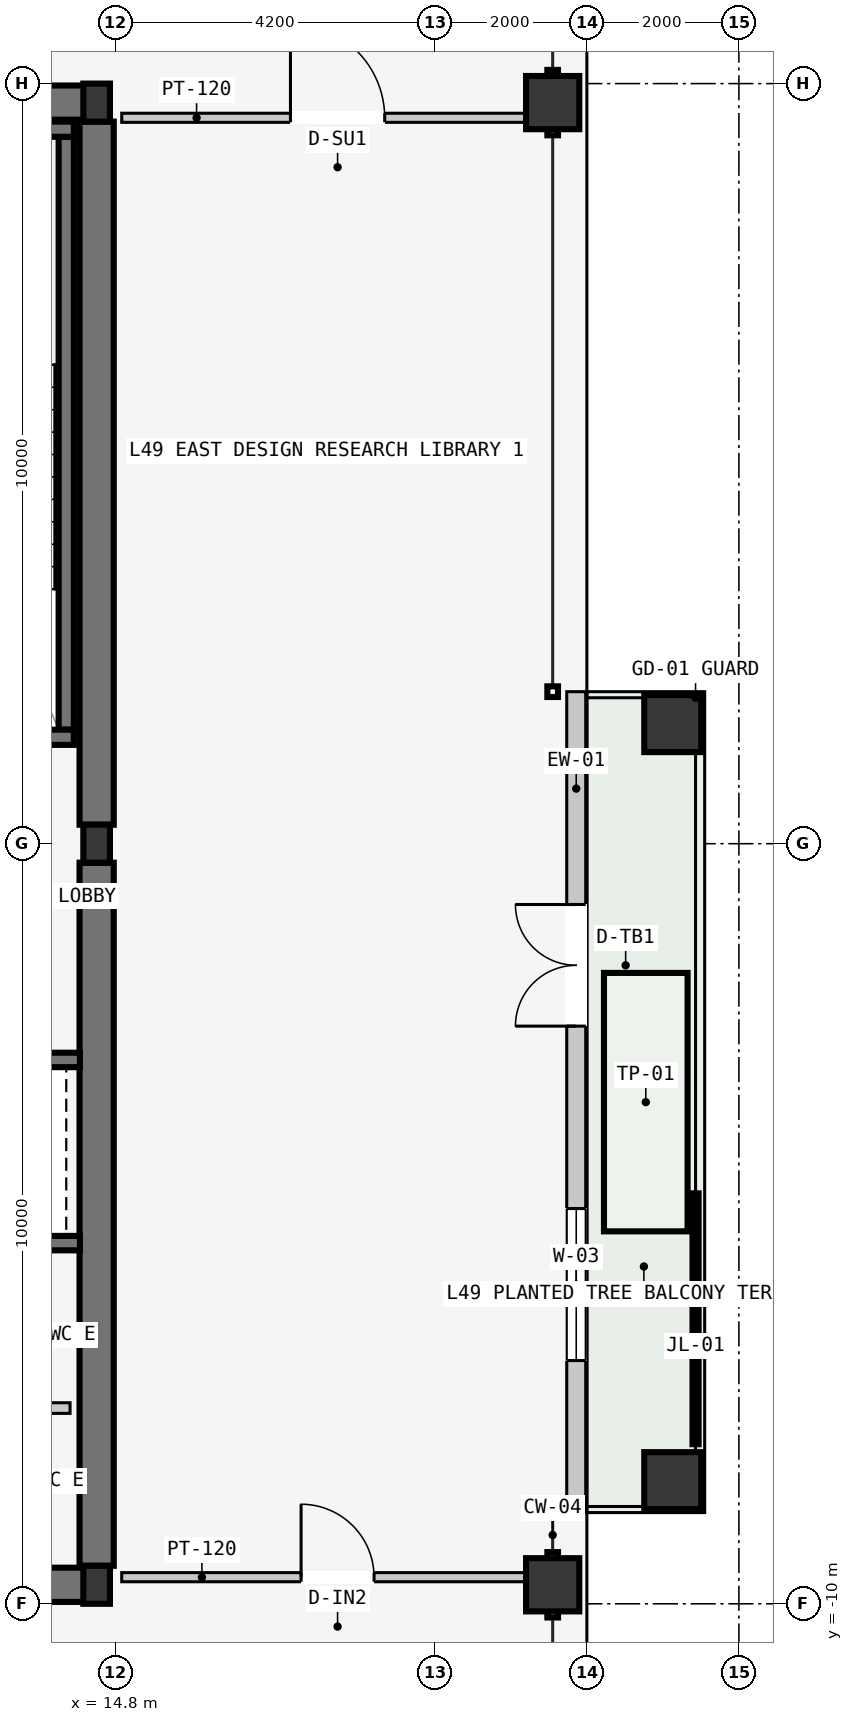
"""IFC4 building model, lengths in metres.
Left out: names, types, materials, properties, quantities, classifications, styles, units other than length and angle.
Written with IfcOpenShell. Run it as: python <this file> out.ifc"""

import sys

from ifc_helpers import new_model, si_unit, direction, frame, frame_2d, origin, origin_2d, place, context, subcontext, project, spatial, rectangle, hollow_rectangle, i_section, extrude, element, fill, save


model = new_model("IFC4")
c1 = context("Model", 3, precision=1e-05, world=origin(), true_north=direction((0.0, 1.0)))
c2 = subcontext(c1, "Body", "Model", "MODEL_VIEW")
j1 = project(units=[si_unit("LENGTHUNIT", "METRE"), si_unit("PLANEANGLEUNIT", "RADIAN")], contexts=[c1])
p1 = place(None, origin())
s1 = spatial("IfcSite", under=j1, at=p1, CompositionType="ELEMENT")
p2 = place(p1, origin())
s2 = spatial("IfcBuilding", under=s1, at=p2, CompositionType="ELEMENT")
p3 = place(p2, frame((0.0, 0.0, 187.5)))
s3 = spatial("IfcBuildingStorey", under=s2, at=p3, CompositionType="ELEMENT", Elevation=187.5)
for number, where, z_axis, x_axis in (
    (1, (8.07, -9.75, -0.2), (0.0, 0.0, 1.0), (1.0, 0.0, 0.0)),
    (2, (8.07, 9.75, -0.2), (0.0, 0.0, 1.0), (1.0, 0.0, 0.0)),
):
    element("IfcWall", number, at=place(p3, frame(where, z_axis=z_axis, x_axis=x_axis)), inside=s3, PredefinedType="SHEAR", context=c2, shape_type="SweptSolid", body=[
        extrude(rectangle(XDim=6.46, YDim=0.45, at=frame_2d((3.23, 0.0))), origin(), (0.0, 0.0, 1.0), 3.6),
    ])
for number, where, z_axis, x_axis in (
    (3, (14.55, -9.5, -0.2), (0.0, 0.0, 1.0), (0.0, 1.0, 0.0)),
    (4, (14.55, 0.25, -0.2), (0.0, 0.0, 1.0), (0.0, 1.0, 0.0)),
):
    element("IfcWall", number, at=place(p3, frame(where, z_axis=z_axis, x_axis=x_axis)), inside=s3, PredefinedType="SHEAR", context=c2, shape_type="SweptSolid", body=[
        extrude(rectangle(XDim=9.25, YDim=0.45, at=frame_2d((4.625, 0.0))), origin(), (0.0, 0.0, 1.0), 3.6),
    ])
p4 = place(p3, frame((14.15, 1.5, -0.2), z_axis=(0.0, 0.0, 1.0), x_axis=(0.0, 1.0, 0.0)))
e5 = element("IfcWall", 5, at=p4, inside=s3, PredefinedType="SOLIDWALL", context=c2, shape_type="SweptSolid", body=[
    extrude(rectangle(XDim=7.8, YDim=0.2, at=frame_2d((3.9, 0.0))), origin(), (0.0, 0.0, 1.0), 3.6),
])
p5 = place(p3, frame((10.53, 1.4, -0.2), z_axis=(0.0, 0.0, 1.0), x_axis=(1.0, 0.0, 0.0)))
e6 = element("IfcWall", 6, at=p5, inside=s3, PredefinedType="SOLIDWALL", context=c2, shape_type="SweptSolid", body=[
    extrude(rectangle(XDim=3.72, YDim=0.2, at=frame_2d((1.86, 0.0))), origin(), (0.0, 0.0, 1.0), 3.6),
])
p6 = place(p5, frame((1.5, 0.0, 0.2)))
e7 = element("IfcOpeningElement", 7, at=p6, cuts=e6, PredefinedType="OPENING", context=c2, shape_type="SweptSolid", body=[
    extrude(rectangle(XDim=1.12, YDim=2.18, at=frame_2d((0.56, 1.09))), frame((0.0, 0.11, 0.0), z_axis=(0.0, -1.0, 0.0), x_axis=(1.0, 0.0, 0.0)), (0.0, 0.0, 1.0), 0.22),
])
p7 = place(p3, frame((10.53, 9.4, -0.2), z_axis=(0.0, 0.0, 1.0), x_axis=(1.0, 0.0, 0.0)))
e8 = element("IfcWall", 8, at=p7, inside=s3, PredefinedType="SOLIDWALL", context=c2, shape_type="SweptSolid", body=[
    extrude(rectangle(XDim=3.72, YDim=0.2, at=frame_2d((1.86, 0.0))), origin(), (0.0, 0.0, 1.0), 3.6),
])
for number, where, z_axis, x_axis in (
    (9, (14.55, -9.75, 0.0), (0.0, 0.0, 1.0), (1.0, 0.0, 0.0)),
    (10, (14.55, 0.0, 0.0), (0.0, 0.0, 1.0), (1.0, 0.0, 0.0)),
    (11, (14.55, 9.75, 0.0), (0.0, 0.0, 1.0), (1.0, 0.0, 0.0)),
):
    element("IfcColumn", number, at=place(p3, frame(where, z_axis=z_axis, x_axis=x_axis)), inside=s3, PredefinedType="COLUMN", context=c2, shape_type="SweptSolid", body=[
        extrude(i_section(OverallWidth=0.35, OverallDepth=0.5, WebThickness=0.02, FlangeThickness=0.032, at=origin_2d()), origin(), (0.0, 0.0, 1.0), 3.6),
    ])
for number, where, z_axis, x_axis in (
    (12, (20.55, -9.75, 0.0), (0.0, 0.0, 1.0), (0.0, 1.0, 0.0)),
    (13, (20.55, 9.75, 0.0), (0.0, 0.0, 1.0), (0.0, 1.0, 0.0)),
):
    element("IfcColumn", number, at=place(p3, frame(where, z_axis=z_axis, x_axis=x_axis)), inside=s3, PredefinedType="COLUMN", context=c2, shape_type="SweptSolid", body=[
        extrude(hollow_rectangle(XDim=0.7, YDim=0.7, WallThickness=0.03, at=origin_2d()), origin(), (0.0, 0.0, 1.0), 3.6),
    ])
for number, where, z_axis, x_axis in (
    (14, (22.13, -8.38, 0.0), (0.0, 0.0, 1.0), (0.0, 1.0, 0.0)),
    (15, (22.13, 1.58, 0.0), (0.0, 0.0, 1.0), (0.0, 1.0, 0.0)),
):
    element("IfcColumn", number, at=place(p3, frame(where, z_axis=z_axis, x_axis=x_axis)), inside=s3, PredefinedType="COLUMN", context=c2, shape_type="SweptSolid", body=[
        extrude(hollow_rectangle(XDim=0.75, YDim=0.75, WallThickness=0.032, at=origin_2d()), origin(), (0.0, 0.0, 1.0), 3.6),
    ])
p8 = place(p3, frame((20.86, -8.8, 0.0), z_axis=(0.0, 0.0, 1.0), x_axis=(0.0, 1.0, 0.0)))
e16 = element("IfcWall", 16, at=p8, inside=s3, PredefinedType="STANDARD", context=c2, shape_type="SweptSolid", body=[
    extrude(rectangle(XDim=10.8, YDim=0.25, at=frame_2d((5.4, 0.0))), origin(), (0.0, 0.0, 1.0), 3.4),
])
p9 = place(p8, frame((6.4, 0.0, 0.0)))
e17 = element("IfcOpeningElement", 17, at=p9, cuts=e16, PredefinedType="OPENING", context=c2, shape_type="SweptSolid", body=[
    extrude(rectangle(XDim=1.6, YDim=2.2, at=frame_2d((0.8, 1.1))), frame((0.0, 0.135, 0.0), z_axis=(0.0, -1.0, 0.0), x_axis=(1.0, 0.0, 0.0)), (0.0, 0.0, 1.0), 0.27),
])
p10 = place(p8, frame((2.0, 0.0, 0.85)))
e18 = element("IfcOpeningElement", 18, at=p10, cuts=e16, PredefinedType="OPENING", context=c2, shape_type="SweptSolid", body=[
    extrude(rectangle(XDim=2.0, YDim=2.1, at=frame_2d((1.0, 1.05))), frame((0.0, 0.135, 0.0), z_axis=(0.0, -1.0, 0.0), x_axis=(1.0, 0.0, 0.0)), (0.0, 0.0, 1.0), 0.27),
])
p11 = place(p3, frame((11.65, -2.845, -0.2), z_axis=(0.0, 0.0, 1.0), x_axis=(1.0, 0.0, 0.0)))
e19 = element("IfcWall", 19, at=p11, inside=s3, PredefinedType="SOLIDWALL", context=c2, shape_type="SweptSolid", body=[
    extrude(rectangle(XDim=2.68, YDim=0.19, at=frame_2d((1.34, 0.0))), origin(), (0.0, 0.0, 1.0), 3.6),
])
p12 = place(p11, frame((0.65, 0.0, 0.2)))
e20 = element("IfcOpeningElement", 20, at=p12, cuts=e19, PredefinedType="OPENING", context=c2, shape_type="SweptSolid", body=[
    extrude(rectangle(XDim=1.2, YDim=2.2, at=frame_2d((0.6, 1.1))), frame((0.0, 0.105, 0.0), z_axis=(0.0, -1.0, 0.0), x_axis=(1.0, 0.0, 0.0)), (0.0, 0.0, 1.0), 0.21),
])
p13 = place(p3, frame((11.65, -5.255, -0.2), z_axis=(0.0, 0.0, 1.0), x_axis=(1.0, 0.0, 0.0)))
e21 = element("IfcWall", 21, at=p13, inside=s3, PredefinedType="SOLIDWALL", context=c2, shape_type="SweptSolid", body=[
    extrude(rectangle(XDim=2.68, YDim=0.19, at=frame_2d((1.34, 0.0))), origin(), (0.0, 0.0, 1.0), 3.6),
])
p14 = place(p3, frame((11.7, -7.425, 0.0), z_axis=(0.0, 0.0, 1.0), x_axis=(1.0, 0.0, 0.0)))
e22 = element("IfcWall", 22, at=p14, inside=s3, PredefinedType="PARTITIONING", context=c2, shape_type="SweptSolid", body=[
    extrude(rectangle(XDim=2.5, YDim=0.14, at=frame_2d((1.25, 0.0))), origin(), (0.0, 0.0, 1.0), 3.4),
])
p15 = place(p3, frame((14.88, 9.55, 0.0), z_axis=(0.0, 0.0, 1.0), x_axis=(1.0, 0.0, 0.0)))
e23 = element("IfcWall", 23, at=p15, inside=s3, PredefinedType="PARTITIONING", context=c2, shape_type="SweptSolid", body=[
    extrude(rectangle(XDim=5.68, YDim=0.12, at=frame_2d((2.84, 0.0))), origin(), (0.0, 0.0, 1.0), 3.4),
])
p16 = place(p15, frame((2.22, 0.0, 0.0)))
e24 = element("IfcOpeningElement", 24, at=p16, cuts=e23, PredefinedType="OPENING", context=c2, shape_type="SweptSolid", body=[
    extrude(rectangle(XDim=1.24, YDim=2.24, at=frame_2d((0.62, 1.12))), frame((0.0, 0.07, 0.0), z_axis=(0.0, -1.0, 0.0), x_axis=(1.0, 0.0, 0.0)), (0.0, 0.0, 1.0), 0.14),
])
p17 = place(p3, frame((14.88, -9.65, 0.0), z_axis=(0.0, 0.0, 1.0), x_axis=(1.0, 0.0, 0.0)))
e25 = element("IfcWall", 25, at=p17, inside=s3, PredefinedType="PARTITIONING", context=c2, shape_type="SweptSolid", body=[
    extrude(rectangle(XDim=5.68, YDim=0.12, at=frame_2d((2.84, 0.0))), origin(), (0.0, 0.0, 1.0), 2.75),
])
p18 = place(p17, frame((2.36, 0.0, 0.0)))
e26 = element("IfcOpeningElement", 26, at=p18, cuts=e25, PredefinedType="OPENING", context=c2, shape_type="SweptSolid", body=[
    extrude(rectangle(XDim=0.96, YDim=2.18, at=frame_2d((0.48, 1.09))), frame((0.0, 0.07, 0.0), z_axis=(0.0, -1.0, 0.0), x_axis=(1.0, 0.0, 0.0)), (0.0, 0.0, 1.0), 0.14),
])
p19 = place(p9, origin())
e27 = element("IfcDoor", 27, at=p19, inside=s3, OperationType="DOUBLE_DOOR_SINGLE_SWING", PredefinedType="DOOR", context=c2, shape_type="SweptSolid", body=[
    extrude(rectangle(XDim=1.6, YDim=2.2, at=frame_2d((0.8, 1.1))), frame((0.0, 0.025, 0.0), z_axis=(0.0, -1.0, 0.0), x_axis=(1.0, 0.0, 0.0)), (0.0, 0.0, 1.0), 0.05),
])
fill(e17, e27)
p20 = place(p10, origin())
e28 = element("IfcWindow", 28, at=p20, inside=s3, PartitioningType="SINGLE_PANEL", PredefinedType="WINDOW", context=c2, shape_type="SweptSolid", body=[
    extrude(rectangle(XDim=2.0, YDim=2.1, at=frame_2d((1.0, 1.05))), frame((0.0, 0.03, 0.0), z_axis=(0.0, -1.0, 0.0), x_axis=(1.0, 0.0, 0.0)), (0.0, 0.0, 1.0), 0.06),
])
fill(e18, e28)
p21 = place(p16, origin())
e29 = element("IfcDoor", 29, at=p21, inside=s3, OperationType="SINGLE_SWING_LEFT", PredefinedType="DOOR", context=c2, shape_type="SweptSolid", body=[
    extrude(rectangle(XDim=1.24, YDim=2.24, at=frame_2d((0.62, 1.12))), frame((0.0, 0.025, 0.0), z_axis=(0.0, -1.0, 0.0), x_axis=(1.0, 0.0, 0.0)), (0.0, 0.0, 1.0), 0.05),
])
fill(e24, e29)
p22 = place(p18, origin())
e30 = element("IfcDoor", 30, at=p22, inside=s3, OperationType="SINGLE_SWING_LEFT", PredefinedType="DOOR", context=c2, shape_type="SweptSolid", body=[
    extrude(rectangle(XDim=0.96, YDim=2.18, at=frame_2d((0.48, 1.09))), frame((0.0, 0.025, 0.0), z_axis=(0.0, -1.0, 0.0), x_axis=(1.0, 0.0, 0.0)), (0.0, 0.0, 1.0), 0.05),
])
fill(e26, e30)
save(model, sys.argv[1])
